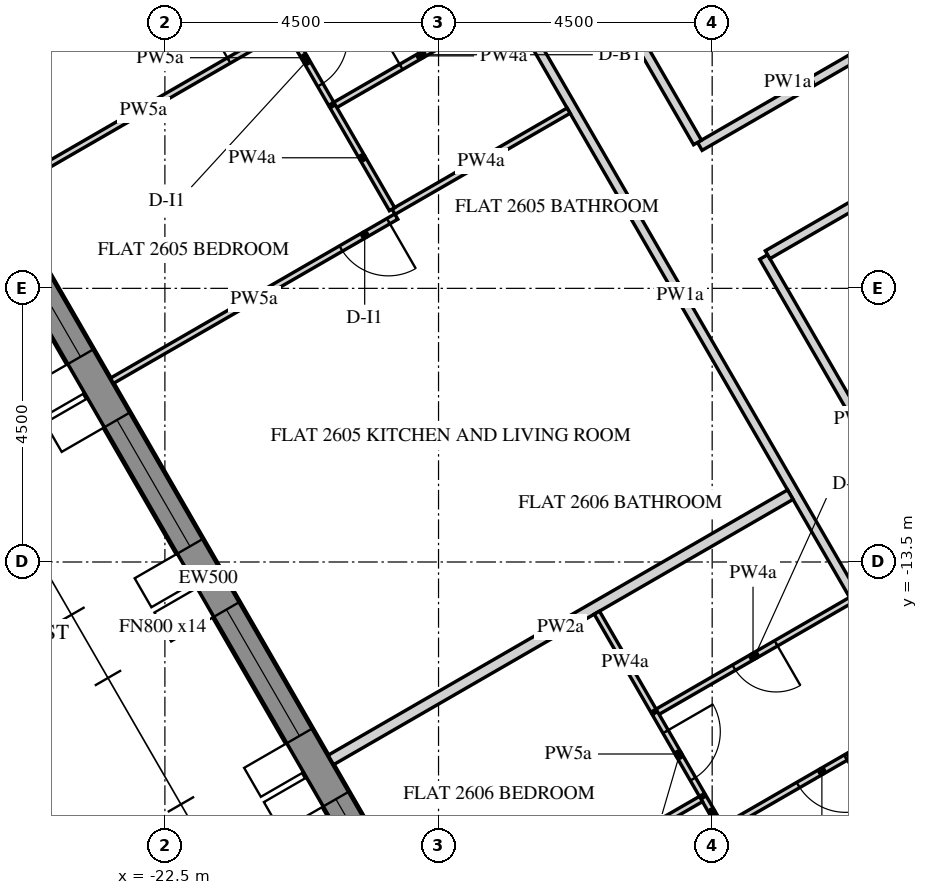
"""IFC4 building model, lengths in metres.
Left out: names, types, materials, properties, quantities, classifications, styles, units other than length and angle.
Written with IfcOpenShell. Run it as: python <this file> out.ifc"""

import sys

from ifc_helpers import new_model, si_unit, direction, frame, frame_2d, origin, place, context, subcontext, project, spatial, polyline, rectangle, outline, extrude, element, fill, save


model = new_model("IFC4")
c1 = context("Model", 3, precision=1e-05, world=origin(), true_north=direction((0.0, 1.0)))
c2 = subcontext(c1, "Body", "Model", "MODEL_VIEW")
j1 = project(units=[si_unit("LENGTHUNIT", "METRE"), si_unit("PLANEANGLEUNIT", "RADIAN")], contexts=[c1])
p1 = place(None, origin())
s1 = spatial("IfcSite", under=j1, at=p1, CompositionType="ELEMENT")
p2 = place(p1, origin())
s2 = spatial("IfcBuilding", under=s1, at=p2, CompositionType="ELEMENT")
p3 = place(p2, frame((0.0, 0.0, 326.4)))
s3 = spatial("IfcBuildingStorey", under=s2, at=p3, CompositionType="ELEMENT", Elevation=326.4)
p4 = place(p3, frame((-28.149, -2.745, -0.15), z_axis=(0.0, 0.0, 1.0), x_axis=(0.500003737743, -0.866023245787, 0.0)))
e1 = element("IfcWall", 1, at=p4, inside=s3, PredefinedType="SOLIDWALL", context=c2, shape_type="SweptSolid", body=[
    extrude(outline(polyline([(-0.021, -0.25), (25.468, -0.25), (25.421, 0.25), (0.021, 0.25), (-0.021, -0.25)])), origin(), (0.0, 0.0, 1.0), 3.9),
])
p5 = place(p4, frame((2.522, 0.0, 0.75)))
e2 = element("IfcOpeningElement", 2, at=p5, cuts=e1, PredefinedType="OPENING", context=c2, shape_type="SweptSolid", body=[
    extrude(rectangle(XDim=2.4, YDim=2.7, at=frame_2d((1.2, 1.35))), frame((0.0, 0.26, 0.0), z_axis=(0.0, -1.0, 0.0), x_axis=(1.0, 0.0, 0.0)), (0.0, 0.0, 1.0), 0.52),
])
p6 = place(p4, frame((6.122, 0.0, 0.75)))
e3 = element("IfcOpeningElement", 3, at=p6, cuts=e1, PredefinedType="OPENING", context=c2, shape_type="SweptSolid", body=[
    extrude(rectangle(XDim=2.4, YDim=2.7, at=frame_2d((1.2, 1.35))), frame((0.0, 0.26, 0.0), z_axis=(0.0, -1.0, 0.0), x_axis=(1.0, 0.0, 0.0)), (0.0, 0.0, 1.0), 0.52),
])
p7 = place(p4, frame((9.722, 0.0, 0.75)))
e4 = element("IfcOpeningElement", 4, at=p7, cuts=e1, PredefinedType="OPENING", context=c2, shape_type="SweptSolid", body=[
    extrude(rectangle(XDim=2.4, YDim=2.7, at=frame_2d((1.2, 1.35))), frame((0.0, 0.26, 0.0), z_axis=(0.0, -1.0, 0.0), x_axis=(1.0, 0.0, 0.0)), (0.0, 0.0, 1.0), 0.52),
])
p8 = place(p4, frame((13.323, 0.0, 0.75)))
e5 = element("IfcOpeningElement", 5, at=p8, cuts=e1, PredefinedType="OPENING", context=c2, shape_type="SweptSolid", body=[
    extrude(rectangle(XDim=2.4, YDim=2.7, at=frame_2d((1.2, 1.35))), frame((0.0, 0.26, 0.0), z_axis=(0.0, -1.0, 0.0), x_axis=(1.0, 0.0, 0.0)), (0.0, 0.0, 1.0), 0.52),
])
p9 = place(p4, frame((16.922, 0.0, 0.75)))
e6 = element("IfcOpeningElement", 6, at=p9, cuts=e1, PredefinedType="OPENING", context=c2, shape_type="SweptSolid", body=[
    extrude(rectangle(XDim=2.4, YDim=2.7, at=frame_2d((1.2, 1.35))), frame((0.0, 0.26, 0.0), z_axis=(0.0, -1.0, 0.0), x_axis=(1.0, 0.0, 0.0)), (0.0, 0.0, 1.0), 0.52),
])
p10 = place(p4, frame((20.522, 0.0, 0.75)))
e7 = element("IfcOpeningElement", 7, at=p10, cuts=e1, PredefinedType="OPENING", context=c2, shape_type="SweptSolid", body=[
    extrude(rectangle(XDim=2.4, YDim=2.7, at=frame_2d((1.2, 1.35))), frame((0.0, 0.26, 0.0), z_axis=(0.0, -1.0, 0.0), x_axis=(1.0, 0.0, 0.0)), (0.0, 0.0, 1.0), 0.52),
])
p11 = place(p3, frame((-12.471, 0.0, -0.15), z_axis=(0.0, 0.0, 1.0), x_axis=(0.499996419489, -0.866027470984, 0.0)))
e8 = element("IfcWall", 8, at=p11, inside=s3, PredefinedType="SHEAR", context=c2, shape_type="SweptSolid", body=[
    extrude(outline(polyline([(-0.115, -0.2), (12.586, -0.2), (12.355, 0.2), (0.115, 0.2), (-0.115, -0.2)])), origin(), (0.0, 0.0, 1.0), 3.9),
])
p12 = place(p11, frame((5.306, 0.0, 0.15)))
e9 = element("IfcOpeningElement", 9, at=p12, cuts=e8, PredefinedType="OPENING", context=c2, shape_type="SweptSolid", body=[
    extrude(rectangle(XDim=1.8, YDim=2.4, at=frame_2d((0.9, 1.2))), frame((0.0, 0.21, 0.0), z_axis=(0.0, -1.0, 0.0), x_axis=(1.0, 0.0, 0.0)), (0.0, 0.0, 1.0), 0.42),
])
p13 = place(p3, frame((-17.696, -2.749, 0.0), z_axis=(0.0, 0.0, 1.0), x_axis=(0.499997948852, -0.866026588012, 0.0)))
e10 = element("IfcWall", 10, at=p13, inside=s3, PredefinedType="PARTITIONING", context=c2, shape_type="SweptSolid", body=[
    extrude(rectangle(XDim=14.677, YDim=0.15, at=frame_2d((7.339, 0.0))), origin(), (0.0, 0.0, 1.0), 2.838),
])
p14 = place(p13, frame((0.4, 0.0, 0.0)))
e11 = element("IfcOpeningElement", 11, at=p14, cuts=e10, PredefinedType="OPENING", context=c2, shape_type="SweptSolid", body=[
    extrude(rectangle(XDim=1.0, YDim=2.1, at=frame_2d((0.5, 1.05))), frame((0.0, 0.085, 0.0), z_axis=(0.0, -1.0, 0.0), x_axis=(1.0, 0.0, 0.0)), (0.0, 0.0, 1.0), 0.17),
])
p15 = place(p13, frame((13.527, 0.0, 0.0)))
e12 = element("IfcOpeningElement", 12, at=p15, cuts=e10, PredefinedType="OPENING", context=c2, shape_type="SweptSolid", body=[
    extrude(rectangle(XDim=1.0, YDim=2.1, at=frame_2d((0.5, 1.05))), frame((0.0, 0.085, 0.0), z_axis=(0.0, -1.0, 0.0), x_axis=(1.0, 0.0, 0.0)), (0.0, 0.0, 1.0), 0.17),
])
p16 = place(p3, frame((-10.066, -4.566, 0.0), z_axis=(0.0, 0.0, 1.0), x_axis=(-0.866023935413, -0.500002543286, 0.0)))
e13 = element("IfcWall", 13, at=p16, inside=s3, PredefinedType="PARTITIONING", context=c2, shape_type="SweptSolid", body=[
    extrude(rectangle(XDim=4.2, YDim=0.15, at=frame_2d((2.1, 0.0))), origin(), (0.0, 0.0, 1.0), 2.838),
])
p17 = place(p3, frame((-13.74, -6.601, 0.0), z_axis=(0.0, 0.0, 1.0), x_axis=(-0.499976727135, 0.866038839962, 0.0)))
e14 = element("IfcWall", 14, at=p17, inside=s3, PredefinedType="PARTITIONING", context=c2, shape_type="SweptSolid", body=[
    extrude(rectangle(XDim=4.516, YDim=0.15, at=frame_2d((2.258, 0.0))), origin(), (0.0, 0.0, 1.0), 2.838),
])
p18 = place(p3, frame((-9.569, -13.826, 0.0), z_axis=(0.0, 0.0, 1.0), x_axis=(-0.500017101833, 0.866015529811, 0.0)))
e15 = element("IfcWall", 15, at=p18, inside=s3, PredefinedType="PARTITIONING", context=c2, shape_type="SweptSolid", body=[
    extrude(rectangle(XDim=6.168, YDim=0.15, at=frame_2d((3.084, 0.0))), origin(), (0.0, 0.0, 1.0), 2.838),
])
p19 = place(p3, frame((-12.588, -8.447, 0.0), z_axis=(0.0, 0.0, 1.0), x_axis=(0.866034795751, 0.499983732284, 0.0)))
e16 = element("IfcWall", 16, at=p19, inside=s3, PredefinedType="PARTITIONING", context=c2, shape_type="SweptSolid", body=[
    extrude(rectangle(XDim=4.125, YDim=0.15, at=frame_2d((2.062, 0.0))), origin(), (0.0, 0.0, 1.0), 2.838),
])
p20 = place(p3, frame((-15.861, -6.078, 0.0), z_axis=(0.0, 0.0, 1.0), x_axis=(-0.866020521143, -0.500008456887, 0.0)))
e17 = element("IfcWall", 17, at=p20, inside=s3, PredefinedType="PARTITIONING", context=c2, shape_type="SweptSolid", body=[
    extrude(rectangle(XDim=3.325, YDim=0.1, at=frame_2d((1.663, 0.0))), origin(), (0.0, 0.0, 1.0), 2.838),
])
p21 = place(p3, frame((-18.695, -7.82, 0.0), z_axis=(0.0, 0.0, 1.0), x_axis=(-0.866028230842, -0.499995103361, 0.0)))
e18 = element("IfcWall", 18, at=p21, inside=s3, PredefinedType="PARTITIONING", context=c2, shape_type="SweptSolid", body=[
    extrude(rectangle(XDim=5.4, YDim=0.1, at=frame_2d((2.7, 0.0))), origin(), (0.0, 0.0, 1.0), 2.838),
])
p22 = place(p21, frame((0.15, 0.0, 0.0)))
e19 = element("IfcOpeningElement", 19, at=p22, cuts=e18, PredefinedType="OPENING", context=c2, shape_type="SweptSolid", body=[
    extrude(rectangle(XDim=0.9, YDim=2.1, at=frame_2d((0.45, 1.05))), frame((0.0, 0.06, 0.0), z_axis=(0.0, -1.0, 0.0), x_axis=(1.0, 0.0, 0.0)), (0.0, 0.0, 1.0), 0.12),
])
p23 = place(p3, frame((-19.771, -16.755, 0.0), z_axis=(0.0, 0.0, 1.0), x_axis=(0.866025292695, 0.500000192413, 0.0)))
e20 = element("IfcWall", 20, at=p23, inside=s3, PredefinedType="PARTITIONING", context=c2, shape_type="SweptSolid", body=[
    extrude(rectangle(XDim=8.725, YDim=0.18, at=frame_2d((4.363, 0.0))), origin(), (0.0, 0.0, 1.0), 2.838),
])
p24 = place(p3, frame((-19.741, -6.008, 0.0), z_axis=(0.0, 0.0, 1.0), x_axis=(0.866052313871, 0.499953387465, 0.0)))
e21 = element("IfcWall", 21, at=p24, inside=s3, PredefinedType="PARTITIONING", context=c2, shape_type="SweptSolid", body=[
    extrude(rectangle(XDim=3.325, YDim=0.1, at=frame_2d((1.663, 0.0))), origin(), (0.0, 0.0, 1.0), 2.838),
])
p25 = place(p24, frame((1.3, 0.0, 0.0)))
e22 = element("IfcOpeningElement", 22, at=p25, cuts=e21, PredefinedType="OPENING", context=c2, shape_type="SweptSolid", body=[
    extrude(rectangle(XDim=0.8, YDim=2.1, at=frame_2d((0.4, 1.05))), frame((0.0, 0.06, 0.0), z_axis=(0.0, -1.0, 0.0), x_axis=(1.0, 0.0, 0.0)), (0.0, 0.0, 1.0), 0.12),
])
p26 = place(p3, frame((-20.642, -4.448, 0.0), z_axis=(0.0, 0.0, 1.0), x_axis=(0.499971461383, -0.866041879935, 0.0)))
e23 = element("IfcWall", 23, at=p26, inside=s3, PredefinedType="PARTITIONING", context=c2, shape_type="SweptSolid", body=[
    extrude(rectangle(XDim=1.754, YDim=0.1, at=frame_2d((0.877, 0.0))), origin(), (0.0, 0.0, 1.0), 2.838),
])
p27 = place(p26, frame((0.494, 0.0, 0.0)))
e24 = element("IfcOpeningElement", 24, at=p27, cuts=e23, PredefinedType="OPENING", context=c2, shape_type="SweptSolid", body=[
    extrude(rectangle(XDim=0.9, YDim=2.1, at=frame_2d((0.45, 1.05))), frame((0.0, 0.06, 0.0), z_axis=(0.0, -1.0, 0.0), x_axis=(1.0, 0.0, 0.0)), (0.0, 0.0, 1.0), 0.12),
])
p28 = place(p3, frame((-19.742, -6.006, 0.0), z_axis=(0.0, 0.0, 1.0), x_axis=(0.499982003349, -0.866035793907, 0.0)))
e25 = element("IfcWall", 25, at=p28, inside=s3, PredefinedType="PARTITIONING", context=c2, shape_type="SweptSolid", body=[
    extrude(rectangle(XDim=1.954, YDim=0.1, at=frame_2d((0.977, 0.0))), origin(), (0.0, 0.0, 1.0), 2.838),
])
p29 = place(p3, frame((-25.171, -7.402, 0.0), z_axis=(0.0, 0.0, 1.0), x_axis=(0.866013074135, 0.500021354972, 0.0)))
e26 = element("IfcWall", 26, at=p29, inside=s3, PredefinedType="PARTITIONING", context=c2, shape_type="SweptSolid", body=[
    extrude(rectangle(XDim=5.35, YDim=0.1, at=frame_2d((2.675, 0.0))), origin(), (0.0, 0.0, 1.0), 2.838),
])
p30 = place(p29, frame((4.3, 0.0, 0.0)))
e27 = element("IfcOpeningElement", 27, at=p30, cuts=e26, PredefinedType="OPENING", context=c2, shape_type="SweptSolid", body=[
    extrude(rectangle(XDim=0.9, YDim=2.1, at=frame_2d((0.45, 1.05))), frame((0.0, 0.06, 0.0), z_axis=(0.0, -1.0, 0.0), x_axis=(1.0, 0.0, 0.0)), (0.0, 0.0, 1.0), 0.12),
])
p31 = place(p3, frame((-9.107, -15.448, 0.0), z_axis=(0.0, 0.0, 1.0), x_axis=(-0.866025094983, -0.500000534859, 0.0)))
e28 = element("IfcWall", 28, at=p31, inside=s3, PredefinedType="PARTITIONING", context=c2, shape_type="SweptSolid", body=[
    extrude(rectangle(XDim=4.889, YDim=0.1, at=frame_2d((2.445, 0.0))), origin(), (0.0, 0.0, 1.0), 2.838),
])
p32 = place(p31, frame((2.539, 0.0, 0.0)))
e29 = element("IfcOpeningElement", 29, at=p32, cuts=e28, PredefinedType="OPENING", context=c2, shape_type="SweptSolid", body=[
    extrude(rectangle(XDim=0.9, YDim=2.1, at=frame_2d((0.45, 1.05))), frame((0.0, 0.06, 0.0), z_axis=(0.0, -1.0, 0.0), x_axis=(1.0, 0.0, 0.0)), (0.0, 0.0, 1.0), 0.12),
])
p33 = place(p3, frame((-13.366, -17.849, 0.0), z_axis=(0.0, 0.0, 1.0), x_axis=(-0.499850094852, 0.866111934265, 0.0)))
e30 = element("IfcWall", 30, at=p33, inside=s3, PredefinedType="PARTITIONING", context=c2, shape_type="SweptSolid", body=[
    extrude(rectangle(XDim=0.552, YDim=0.1, at=frame_2d((0.276, 0.0))), origin(), (0.0, 0.0, 1.0), 2.838),
])
p34 = place(p3, frame((-13.684, -17.398, 0.0), z_axis=(0.0, 0.0, 1.0), x_axis=(-0.866040211805, -0.499974350878, 0.0)))
e31 = element("IfcWall", 31, at=p34, inside=s3, PredefinedType="PARTITIONING", context=c2, shape_type="SweptSolid", body=[
    extrude(rectangle(XDim=4.95, YDim=0.1, at=frame_2d((2.475, 0.0))), origin(), (0.0, 0.0, 1.0), 2.838),
])
p35 = place(p3, frame((-11.215, -14.125, 0.0), z_axis=(0.0, 0.0, 1.0), x_axis=(-0.866028424924, -0.499994767197, 0.0)))
e32 = element("IfcWall", 32, at=p35, inside=s3, PredefinedType="PARTITIONING", context=c2, shape_type="SweptSolid", body=[
    extrude(rectangle(XDim=3.725, YDim=0.1, at=frame_2d((1.863, 0.0))), origin(), (0.0, 0.0, 1.0), 2.838),
])
p36 = place(p35, frame((1.425, 0.0, 0.0)))
e33 = element("IfcOpeningElement", 33, at=p36, cuts=e32, PredefinedType="OPENING", context=c2, shape_type="SweptSolid", body=[
    extrude(rectangle(XDim=0.8, YDim=2.1, at=frame_2d((0.4, 1.05))), frame((0.0, 0.06, 0.0), z_axis=(0.0, -1.0, 0.0), x_axis=(1.0, 0.0, 0.0)), (0.0, 0.0, 1.0), 0.12),
])
p37 = place(p3, frame((-14.442, -15.986, 0.0), z_axis=(0.0, 0.0, 1.0), x_axis=(0.50008102322, -0.865978619952, 0.0)))
e34 = element("IfcWall", 34, at=p37, inside=s3, PredefinedType="PARTITIONING", context=c2, shape_type="SweptSolid", body=[
    extrude(rectangle(XDim=1.552, YDim=0.1, at=frame_2d((0.776, 0.0))), origin(), (0.0, 0.0, 1.0), 2.838),
])
p38 = place(p37, frame((0.352, 0.0, 0.0)))
e35 = element("IfcOpeningElement", 35, at=p38, cuts=e34, PredefinedType="OPENING", context=c2, shape_type="SweptSolid", body=[
    extrude(rectangle(XDim=0.9, YDim=2.1, at=frame_2d((0.45, 1.05))), frame((0.0, 0.06, 0.0), z_axis=(0.0, -1.0, 0.0), x_axis=(1.0, 0.0, 0.0)), (0.0, 0.0, 1.0), 0.12),
])
p39 = place(p3, frame((-15.396, -14.333, 0.0), z_axis=(0.0, 0.0, 1.0), x_axis=(0.500115926523, -0.865958463229, 0.0)))
e36 = element("IfcWall", 36, at=p39, inside=s3, PredefinedType="PARTITIONING", context=c2, shape_type="SweptSolid", body=[
    extrude(rectangle(XDim=1.862, YDim=0.1, at=frame_2d((0.931, 0.0))), origin(), (0.0, 0.0, 1.0), 2.838),
])
p40 = place(p6, frame((0.0, 0.18, 0.0)))
e37 = element("IfcWindow", 37, at=p40, inside=s3, PartitioningType="DOUBLE_PANEL_VERTICAL", PredefinedType="WINDOW", context=c2, shape_type="SweptSolid", body=[
    extrude(rectangle(XDim=2.4, YDim=2.7, at=frame_2d((1.2, 1.35))), frame((0.0, 0.03, 0.0), z_axis=(0.0, -1.0, 0.0), x_axis=(1.0, 0.0, 0.0)), (0.0, 0.0, 1.0), 0.06),
])
fill(e3, e37)
p41 = place(p7, frame((0.0, 0.18, 0.0)))
e38 = element("IfcWindow", 38, at=p41, inside=s3, PartitioningType="DOUBLE_PANEL_VERTICAL", PredefinedType="WINDOW", context=c2, shape_type="SweptSolid", body=[
    extrude(rectangle(XDim=2.4, YDim=2.7, at=frame_2d((1.2, 1.35))), frame((0.0, 0.03, 0.0), z_axis=(0.0, -1.0, 0.0), x_axis=(1.0, 0.0, 0.0)), (0.0, 0.0, 1.0), 0.06),
])
fill(e4, e38)
p42 = place(p8, frame((0.0, 0.18, 0.0)))
e39 = element("IfcWindow", 39, at=p42, inside=s3, PartitioningType="DOUBLE_PANEL_VERTICAL", PredefinedType="WINDOW", context=c2, shape_type="SweptSolid", body=[
    extrude(rectangle(XDim=2.4, YDim=2.7, at=frame_2d((1.2, 1.35))), frame((0.0, 0.03, 0.0), z_axis=(0.0, -1.0, 0.0), x_axis=(1.0, 0.0, 0.0)), (0.0, 0.0, 1.0), 0.06),
])
fill(e5, e39)
p43 = place(p9, frame((0.0, 0.18, 0.0)))
e40 = element("IfcWindow", 40, at=p43, inside=s3, PartitioningType="DOUBLE_PANEL_VERTICAL", PredefinedType="WINDOW", context=c2, shape_type="SweptSolid", body=[
    extrude(rectangle(XDim=2.4, YDim=2.7, at=frame_2d((1.2, 1.35))), frame((0.0, 0.03, 0.0), z_axis=(0.0, -1.0, 0.0), x_axis=(1.0, 0.0, 0.0)), (0.0, 0.0, 1.0), 0.06),
])
fill(e6, e40)
p44 = place(p25, origin())
e41 = element("IfcDoor", 41, at=p44, inside=s3, OperationType="SINGLE_SWING_LEFT", PredefinedType="DOOR", context=c2, shape_type="SweptSolid", body=[
    extrude(rectangle(XDim=0.8, YDim=2.1, at=frame_2d((0.4, 1.05))), frame((0.0, 0.025, 0.0), z_axis=(0.0, -1.0, 0.0), x_axis=(1.0, 0.0, 0.0)), (0.0, 0.0, 1.0), 0.05),
])
fill(e22, e41)
p45 = place(p27, origin())
e42 = element("IfcDoor", 42, at=p45, inside=s3, OperationType="SINGLE_SWING_RIGHT", PredefinedType="DOOR", context=c2, shape_type="SweptSolid", body=[
    extrude(rectangle(XDim=0.9, YDim=2.1, at=frame_2d((0.45, 1.05))), frame((0.0, 0.025, 0.0), z_axis=(0.0, -1.0, 0.0), x_axis=(1.0, 0.0, 0.0)), (0.0, 0.0, 1.0), 0.05),
])
fill(e24, e42)
p46 = place(p30, origin())
e43 = element("IfcDoor", 43, at=p46, inside=s3, OperationType="SINGLE_SWING_RIGHT", PredefinedType="DOOR", context=c2, shape_type="SweptSolid", body=[
    extrude(rectangle(XDim=0.9, YDim=2.1, at=frame_2d((0.45, 1.05))), frame((0.0, 0.025, 0.0), z_axis=(0.0, -1.0, 0.0), x_axis=(1.0, 0.0, 0.0)), (0.0, 0.0, 1.0), 0.05),
])
fill(e27, e43)
p47 = place(p22, origin())
e44 = element("IfcDoor", 44, at=p47, inside=s3, OperationType="SINGLE_SWING_RIGHT", PredefinedType="DOOR", context=c2, shape_type="SweptSolid", body=[
    extrude(rectangle(XDim=0.9, YDim=2.1, at=frame_2d((0.45, 1.05))), frame((0.0, 0.025, 0.0), z_axis=(0.0, -1.0, 0.0), x_axis=(1.0, 0.0, 0.0)), (0.0, 0.0, 1.0), 0.05),
])
fill(e19, e44)
p48 = place(p36, origin())
e45 = element("IfcDoor", 45, at=p48, inside=s3, OperationType="SINGLE_SWING_RIGHT", PredefinedType="DOOR", context=c2, shape_type="SweptSolid", body=[
    extrude(rectangle(XDim=0.8, YDim=2.1, at=frame_2d((0.4, 1.05))), frame((0.0, 0.025, 0.0), z_axis=(0.0, -1.0, 0.0), x_axis=(1.0, 0.0, 0.0)), (0.0, 0.0, 1.0), 0.05),
])
fill(e33, e45)
p49 = place(p32, origin())
e46 = element("IfcDoor", 46, at=p49, inside=s3, OperationType="SINGLE_SWING_LEFT", PredefinedType="DOOR", context=c2, shape_type="SweptSolid", body=[
    extrude(rectangle(XDim=0.9, YDim=2.1, at=frame_2d((0.45, 1.05))), frame((0.0, 0.025, 0.0), z_axis=(0.0, -1.0, 0.0), x_axis=(1.0, 0.0, 0.0)), (0.0, 0.0, 1.0), 0.05),
])
fill(e29, e46)
p50 = place(p38, origin())
e47 = element("IfcDoor", 47, at=p50, inside=s3, OperationType="SINGLE_SWING_LEFT", PredefinedType="DOOR", context=c2, shape_type="SweptSolid", body=[
    extrude(rectangle(XDim=0.9, YDim=2.1, at=frame_2d((0.45, 1.05))), frame((0.0, 0.025, 0.0), z_axis=(0.0, -1.0, 0.0), x_axis=(1.0, 0.0, 0.0)), (0.0, 0.0, 1.0), 0.05),
])
fill(e35, e47)
save(model, sys.argv[1])
